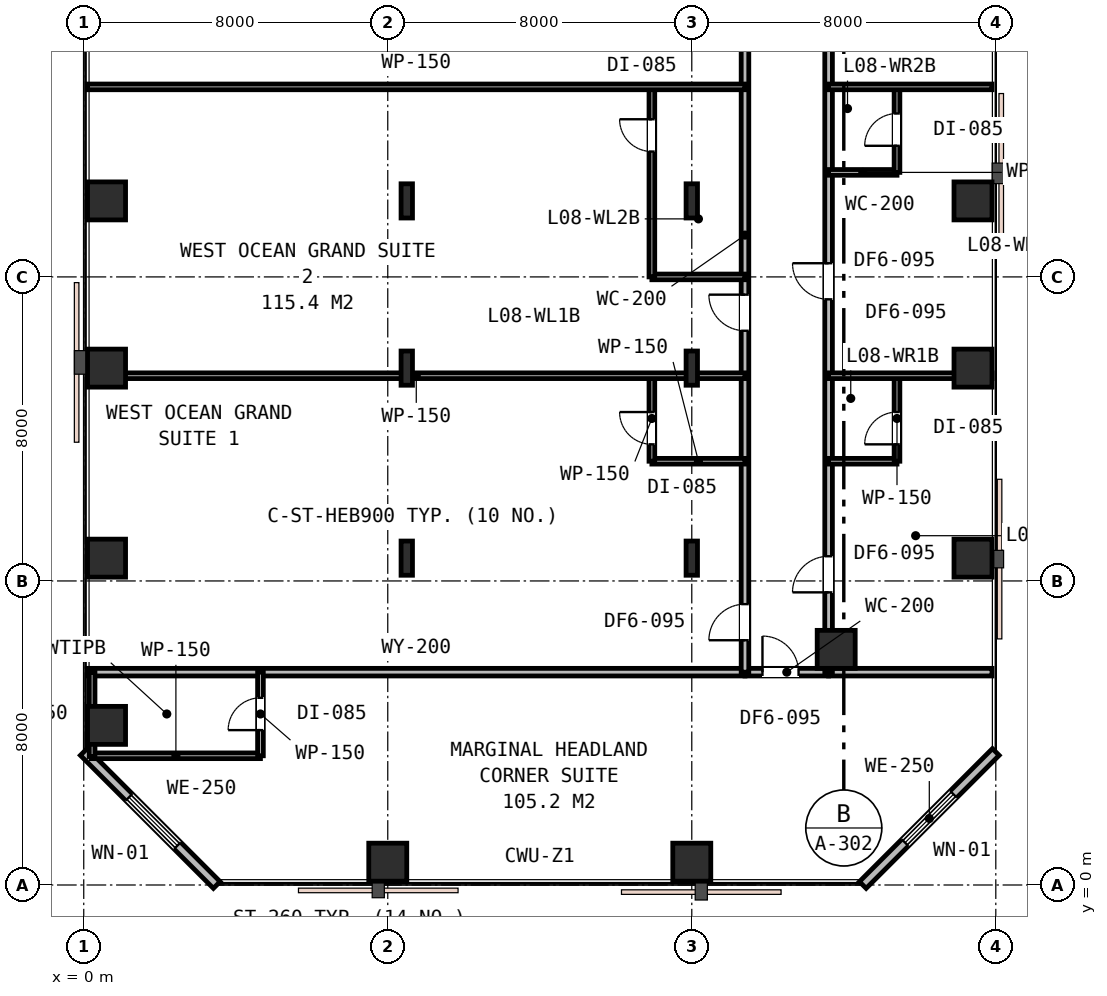
"""IFC4 building model, lengths in metres.
Left out: names, types, materials, properties, quantities, classifications, styles, units other than length and angle.
Written with IfcOpenShell. Run it as: python <this file> out.ifc"""

import sys

from ifc_helpers import new_model, si_unit, direction, frame, frame_2d, origin, origin_2d, place, context, subcontext, project, spatial, rectangle, i_section, extrude, element, fill, save


model = new_model("IFC4")
c1 = context("Model", 3, precision=1e-05, world=origin(), true_north=direction((0.0, 1.0)))
c2 = subcontext(c1, "Body", "Model", "MODEL_VIEW")
j1 = project(units=[si_unit("LENGTHUNIT", "METRE"), si_unit("PLANEANGLEUNIT", "RADIAN")], contexts=[c1])
p1 = place(None, origin())
s1 = spatial("IfcSite", under=j1, at=p1, CompositionType="ELEMENT")
p2 = place(p1, origin())
s2 = spatial("IfcBuilding", under=s1, at=p2, CompositionType="ELEMENT")
p3 = place(p2, frame((0.0, 0.0, 36.6)))
s3 = spatial("IfcBuildingStorey", under=s2, at=p3, CompositionType="ELEMENT", Elevation=36.6)
for number, where, z_axis, x_axis in (
    (1, (0.6, 8.6, 0.0), (0.0, 0.0, 1.0), (1.0, 0.0, 0.0)),
    (2, (0.6, 13.6, 0.0), (0.0, 0.0, 1.0), (1.0, 0.0, 0.0)),
    (3, (0.6, 18.0, 0.0), (0.0, 0.0, 1.0), (1.0, 0.0, 0.0)),
    (4, (0.6, 4.2, 0.0), (0.0, 0.0, 1.0), (1.0, 0.0, 0.0)),
    (5, (8.0, 0.6, 0.0), (0.0, 0.0, 1.0), (1.0, 0.0, 0.0)),
    (6, (16.0, 0.6, 0.0), (0.0, 0.0, 1.0), (1.0, 0.0, 0.0)),
    (7, (19.8, 6.2, 0.0), (0.0, 0.0, 1.0), (1.0, 0.0, 0.0)),
    (8, (23.4, 8.6, 0.0), (0.0, 0.0, 1.0), (1.0, 0.0, 0.0)),
    (9, (23.4, 13.6, 0.0), (0.0, 0.0, 1.0), (1.0, 0.0, 0.0)),
    (10, (23.4, 18.0, 0.0), (0.0, 0.0, 1.0), (1.0, 0.0, 0.0)),
):
    element("IfcColumn", number, at=place(p3, frame(where, z_axis=z_axis, x_axis=x_axis)), inside=s3, PredefinedType="COLUMN", context=c2, shape_type="SweptSolid", body=[
        extrude(rectangle(XDim=1.0, YDim=1.0, at=origin_2d()), origin(), (0.0, 0.0, 1.0), 3.6),
    ])
for number, where, z_axis, x_axis in (
    (11, (8.5, 8.6, 0.0), (0.0, 0.0, 1.0), (1.0, 0.0, 0.0)),
    (12, (16.0, 8.6, 0.0), (0.0, 0.0, 1.0), (1.0, 0.0, 0.0)),
    (13, (8.5, 13.6, 0.0), (0.0, 0.0, 1.0), (1.0, 0.0, 0.0)),
    (14, (16.0, 13.6, 0.0), (0.0, 0.0, 1.0), (1.0, 0.0, 0.0)),
    (15, (8.5, 18.0, 0.0), (0.0, 0.0, 1.0), (1.0, 0.0, 0.0)),
    (16, (16.0, 18.0, 0.0), (0.0, 0.0, 1.0), (1.0, 0.0, 0.0)),
):
    element("IfcColumn", number, at=place(p3, frame(where, z_axis=z_axis, x_axis=x_axis)), inside=s3, PredefinedType="COLUMN", context=c2, shape_type="SweptSolid", body=[
        extrude(i_section(OverallWidth=0.3, OverallDepth=0.9, WebThickness=0.018, FlangeThickness=0.035, FilletRadius=0.03, at=origin_2d()), origin(), (0.0, 0.0, 1.0), 3.6),
    ])
p4 = place(p3, frame((20.5, 0.0, 0.0), z_axis=(0.0, 0.0, 1.0), x_axis=(0.707106781187, 0.707106781187, 0.0)))
e17 = element("IfcWall", 17, at=p4, inside=s3, PredefinedType="STANDARD", context=c2, shape_type="SweptSolid", body=[
    extrude(rectangle(XDim=4.95, YDim=0.25, at=frame_2d((2.475, 0.0))), origin(), (0.0, 0.0, 1.0), 3.33),
])
p5 = place(p4, frame((1.575, 0.0, 0.75)))
e18 = element("IfcOpeningElement", 18, at=p5, cuts=e17, PredefinedType="OPENING", context=c2, shape_type="SweptSolid", body=[
    extrude(rectangle(XDim=1.8, YDim=1.85, at=frame_2d((0.9, 0.925))), frame((0.0, 0.135, 0.0), z_axis=(0.0, -1.0, 0.0), x_axis=(1.0, 0.0, 0.0)), (0.0, 0.0, 1.0), 0.27),
])
p6 = place(p3, frame((0.0, 3.5, 0.0), z_axis=(0.0, 0.0, 1.0), x_axis=(0.707106781187, -0.707106781187, 0.0)))
e19 = element("IfcWall", 19, at=p6, inside=s3, PredefinedType="STANDARD", context=c2, shape_type="SweptSolid", body=[
    extrude(rectangle(XDim=4.95, YDim=0.25, at=frame_2d((2.475, 0.0))), origin(), (0.0, 0.0, 1.0), 3.33),
])
p7 = place(p6, frame((1.685, 0.0, 0.75)))
e20 = element("IfcOpeningElement", 20, at=p7, cuts=e19, PredefinedType="OPENING", context=c2, shape_type="SweptSolid", body=[
    extrude(rectangle(XDim=1.8, YDim=1.85, at=frame_2d((0.9, 0.925))), frame((0.0, 0.135, 0.0), z_axis=(0.0, -1.0, 0.0), x_axis=(1.0, 0.0, 0.0)), (0.0, 0.0, 1.0), 0.27),
])
p8 = place(p3, frame((0.1, 5.6, 0.0), z_axis=(0.0, 0.0, 1.0), x_axis=(1.0, 0.0, 0.0)))
e21 = element("IfcWall", 21, at=p8, inside=s3, PredefinedType="PARTITIONING", context=c2, shape_type="SweptSolid", body=[
    extrude(rectangle(XDim=17.3, YDim=0.2, at=frame_2d((8.65, 0.0))), origin(), (0.0, 0.0, 1.0), 2.82),
])
p9 = place(p3, frame((19.6, 5.6, 0.0), z_axis=(0.0, 0.0, 1.0), x_axis=(1.0, 0.0, 0.0)))
e22 = element("IfcWall", 22, at=p9, inside=s3, PredefinedType="PARTITIONING", context=c2, shape_type="SweptSolid", body=[
    extrude(rectangle(XDim=4.3, YDim=0.2, at=frame_2d((2.15, 0.0))), origin(), (0.0, 0.0, 1.0), 3.33),
])
p10 = place(p3, frame((17.4, 5.6, 0.0), z_axis=(0.0, 0.0, 1.0), x_axis=(1.0, 0.0, 0.0)))
e23 = element("IfcWall", 23, at=p10, inside=s3, PredefinedType="PARTITIONING", context=c2, shape_type="SweptSolid", body=[
    extrude(rectangle(XDim=2.2, YDim=0.2, at=frame_2d((1.1, 0.0))), origin(), (0.0, 0.0, 1.0), 3.33),
])
p11 = place(p10, frame((0.46, 0.0, 0.0)))
e24 = element("IfcOpeningElement", 24, at=p11, cuts=e23, PredefinedType="OPENING", context=c2, shape_type="SweptSolid", body=[
    extrude(rectangle(XDim=0.95, YDim=2.15, at=frame_2d((0.475, 1.075))), frame((0.0, 0.11, 0.0), z_axis=(0.0, -1.0, 0.0), x_axis=(1.0, 0.0, 0.0)), (0.0, 0.0, 1.0), 0.22),
])
p12 = place(p3, frame((0.2, 3.4, 0.0), z_axis=(0.0, 0.0, 1.0), x_axis=(1.0, 0.0, 0.0)))
e25 = element("IfcWall", 25, at=p12, inside=s3, PredefinedType="PARTITIONING", context=c2, shape_type="SweptSolid", body=[
    extrude(rectangle(XDim=4.45, YDim=0.15, at=frame_2d((2.225, 0.0))), origin(), (0.0, 0.0, 1.0), 3.33),
])
p13 = place(p3, frame((4.65, 3.4, 0.0), z_axis=(0.0, 0.0, 1.0), x_axis=(0.0, 1.0, 0.0)))
e26 = element("IfcWall", 26, at=p13, inside=s3, PredefinedType="PARTITIONING", context=c2, shape_type="SweptSolid", body=[
    extrude(rectangle(XDim=2.2, YDim=0.15, at=frame_2d((1.1, 0.0))), origin(), (0.0, 0.0, 1.0), 3.33),
])
p14 = place(p13, frame((0.675, 0.0, 0.0)))
e27 = element("IfcOpeningElement", 27, at=p14, cuts=e26, PredefinedType="OPENING", context=c2, shape_type="SweptSolid", body=[
    extrude(rectangle(XDim=0.85, YDim=2.15, at=frame_2d((0.425, 1.075))), frame((0.0, 0.085, 0.0), z_axis=(0.0, -1.0, 0.0), x_axis=(1.0, 0.0, 0.0)), (0.0, 0.0, 1.0), 0.17),
])
p15 = place(p3, frame((0.22, 3.38, 0.0), z_axis=(0.0, 0.0, 1.0), x_axis=(0.0, 1.0, 0.0)))
e28 = element("IfcWall", 28, at=p15, inside=s3, PredefinedType="PARTITIONING", context=c2, shape_type="SweptSolid", body=[
    extrude(rectangle(XDim=2.22, YDim=0.15, at=frame_2d((1.11, 0.0))), origin(), (0.0, 0.0, 1.0), 2.93),
])
p16 = place(p3, frame((17.4, 5.6, 0.0), z_axis=(0.0, 0.0, 1.0), x_axis=(0.0, 1.0, 0.0)))
e29 = element("IfcWall", 29, at=p16, inside=s3, PredefinedType="PARTITIONING", context=c2, shape_type="SweptSolid", body=[
    extrude(rectangle(XDim=23.0, YDim=0.2, at=frame_2d((11.5, 0.0))), origin(), (0.0, 0.0, 1.0), 2.82),
])
p17 = place(p16, frame((0.84, 0.0, 0.0)))
e30 = element("IfcOpeningElement", 30, at=p17, cuts=e29, PredefinedType="OPENING", context=c2, shape_type="SweptSolid", body=[
    extrude(rectangle(XDim=0.95, YDim=2.15, at=frame_2d((0.475, 1.075))), frame((0.0, 0.11, 0.0), z_axis=(0.0, -1.0, 0.0), x_axis=(1.0, 0.0, 0.0)), (0.0, 0.0, 1.0), 0.22),
])
p18 = place(p16, frame((8.983, 0.0, 0.0)))
e31 = element("IfcOpeningElement", 31, at=p18, cuts=e29, PredefinedType="OPENING", context=c2, shape_type="SweptSolid", body=[
    extrude(rectangle(XDim=0.95, YDim=2.15, at=frame_2d((0.475, 1.075))), frame((0.0, 0.11, 0.0), z_axis=(0.0, -1.0, 0.0), x_axis=(1.0, 0.0, 0.0)), (0.0, 0.0, 1.0), 0.22),
])
p19 = place(p16, frame((16.476, 0.0, 0.0)))
e32 = element("IfcOpeningElement", 32, at=p19, cuts=e29, PredefinedType="OPENING", context=c2, shape_type="SweptSolid", body=[
    extrude(rectangle(XDim=0.95, YDim=2.15, at=frame_2d((0.475, 1.075))), frame((0.0, 0.11, 0.0), z_axis=(0.0, -1.0, 0.0), x_axis=(1.0, 0.0, 0.0)), (0.0, 0.0, 1.0), 0.22),
])
p20 = place(p3, frame((14.95, 11.15, 0.0), z_axis=(0.0, 0.0, 1.0), x_axis=(1.0, 0.0, 0.0)))
e33 = element("IfcWall", 33, at=p20, inside=s3, PredefinedType="PARTITIONING", context=c2, shape_type="SweptSolid", body=[
    extrude(rectangle(XDim=2.45, YDim=0.15, at=frame_2d((1.225, 0.0))), origin(), (0.0, 0.0, 1.0), 2.82),
])
p21 = place(p3, frame((14.95, 11.15, 0.0), z_axis=(0.0, 0.0, 1.0), x_axis=(0.0, 1.0, 0.0)))
e34 = element("IfcWall", 34, at=p21, inside=s3, PredefinedType="PARTITIONING", context=c2, shape_type="SweptSolid", body=[
    extrude(rectangle(XDim=2.25, YDim=0.15, at=frame_2d((1.125, 0.0))), origin(), (0.0, 0.0, 1.0), 2.82),
])
p22 = place(p21, frame((0.444, 0.0, 0.0)))
e35 = element("IfcOpeningElement", 35, at=p22, cuts=e34, PredefinedType="OPENING", context=c2, shape_type="SweptSolid", body=[
    extrude(rectangle(XDim=0.85, YDim=2.15, at=frame_2d((0.425, 1.075))), frame((0.0, 0.085, 0.0), z_axis=(0.0, -1.0, 0.0), x_axis=(1.0, 0.0, 0.0)), (0.0, 0.0, 1.0), 0.17),
])
p23 = place(p3, frame((0.1, 13.4, 0.0), z_axis=(0.0, 0.0, 1.0), x_axis=(1.0, 0.0, 0.0)))
e36 = element("IfcWall", 36, at=p23, inside=s3, PredefinedType="PARTITIONING", context=c2, shape_type="SweptSolid", body=[
    extrude(rectangle(XDim=17.3, YDim=0.15, at=frame_2d((8.65, 0.0))), origin(), (0.0, 0.0, 1.0), 2.82),
])
p24 = place(p3, frame((19.6, 5.6, 0.0), z_axis=(0.0, 0.0, 1.0), x_axis=(0.0, 1.0, 0.0)))
e37 = element("IfcWall", 37, at=p24, inside=s3, PredefinedType="PARTITIONING", context=c2, shape_type="SweptSolid", body=[
    extrude(rectangle(XDim=23.0, YDim=0.2, at=frame_2d((11.5, 0.0))), origin(), (0.0, 0.0, 1.0), 2.82),
])
p25 = place(p24, frame((2.1, 0.0, 0.0)))
e38 = element("IfcOpeningElement", 38, at=p25, cuts=e37, PredefinedType="OPENING", context=c2, shape_type="SweptSolid", body=[
    extrude(rectangle(XDim=0.95, YDim=2.15, at=frame_2d((0.475, 1.075))), frame((0.0, 0.11, 0.0), z_axis=(0.0, -1.0, 0.0), x_axis=(1.0, 0.0, 0.0)), (0.0, 0.0, 1.0), 0.22),
])
p26 = place(p24, frame((9.81, 0.0, 0.0)))
e39 = element("IfcOpeningElement", 39, at=p26, cuts=e37, PredefinedType="OPENING", context=c2, shape_type="SweptSolid", body=[
    extrude(rectangle(XDim=0.95, YDim=2.15, at=frame_2d((0.475, 1.075))), frame((0.0, 0.11, 0.0), z_axis=(0.0, -1.0, 0.0), x_axis=(1.0, 0.0, 0.0)), (0.0, 0.0, 1.0), 0.22),
])
p27 = place(p24, frame((17.41, 0.0, 0.0)))
e40 = element("IfcOpeningElement", 40, at=p27, cuts=e37, PredefinedType="OPENING", context=c2, shape_type="SweptSolid", body=[
    extrude(rectangle(XDim=0.95, YDim=2.15, at=frame_2d((0.475, 1.075))), frame((0.0, 0.11, 0.0), z_axis=(0.0, -1.0, 0.0), x_axis=(1.0, 0.0, 0.0)), (0.0, 0.0, 1.0), 0.22),
])
p28 = place(p3, frame((19.6, 11.15, 0.0), z_axis=(0.0, 0.0, 1.0), x_axis=(1.0, 0.0, 0.0)))
e41 = element("IfcWall", 41, at=p28, inside=s3, PredefinedType="PARTITIONING", context=c2, shape_type="SweptSolid", body=[
    extrude(rectangle(XDim=1.8, YDim=0.15, at=frame_2d((0.9, 0.0))), origin(), (0.0, 0.0, 1.0), 2.96),
])
p29 = place(p3, frame((21.4, 11.15, 0.0), z_axis=(0.0, 0.0, 1.0), x_axis=(0.0, 1.0, 0.0)))
e42 = element("IfcWall", 42, at=p29, inside=s3, PredefinedType="PARTITIONING", context=c2, shape_type="SweptSolid", body=[
    extrude(rectangle(XDim=2.25, YDim=0.15, at=frame_2d((1.125, 0.0))), origin(), (0.0, 0.0, 1.0), 2.82),
])
p30 = place(p29, frame((0.444, 0.0, 0.0)))
e43 = element("IfcOpeningElement", 43, at=p30, cuts=e42, PredefinedType="OPENING", context=c2, shape_type="SweptSolid", body=[
    extrude(rectangle(XDim=0.85, YDim=2.15, at=frame_2d((0.425, 1.075))), frame((0.0, 0.085, 0.0), z_axis=(0.0, -1.0, 0.0), x_axis=(1.0, 0.0, 0.0)), (0.0, 0.0, 1.0), 0.17),
])
p31 = place(p3, frame((19.6, 13.4, 0.0), z_axis=(0.0, 0.0, 1.0), x_axis=(1.0, 0.0, 0.0)))
e44 = element("IfcWall", 44, at=p31, inside=s3, PredefinedType="PARTITIONING", context=c2, shape_type="SweptSolid", body=[
    extrude(rectangle(XDim=4.3, YDim=0.15, at=frame_2d((2.15, 0.0))), origin(), (0.0, 0.0, 1.0), 2.82),
])
p32 = place(p3, frame((14.95, 16.0, 0.0), z_axis=(0.0, 0.0, 1.0), x_axis=(1.0, 0.0, 0.0)))
e45 = element("IfcWall", 45, at=p32, inside=s3, PredefinedType="PARTITIONING", context=c2, shape_type="SweptSolid", body=[
    extrude(rectangle(XDim=2.45, YDim=0.15, at=frame_2d((1.225, 0.0))), origin(), (0.0, 0.0, 1.0), 2.82),
])
p33 = place(p3, frame((14.95, 16.0, 0.0), z_axis=(0.0, 0.0, 1.0), x_axis=(0.0, 1.0, 0.0)))
e46 = element("IfcWall", 46, at=p33, inside=s3, PredefinedType="PARTITIONING", context=c2, shape_type="SweptSolid", body=[
    extrude(rectangle(XDim=5.0, YDim=0.15, at=frame_2d((2.5, 0.0))), origin(), (0.0, 0.0, 1.0), 2.82),
])
p34 = place(p33, frame((3.298, 0.0, 0.0)))
e47 = element("IfcOpeningElement", 47, at=p34, cuts=e46, PredefinedType="OPENING", context=c2, shape_type="SweptSolid", body=[
    extrude(rectangle(XDim=0.85, YDim=2.15, at=frame_2d((0.425, 1.075))), frame((0.0, 0.085, 0.0), z_axis=(0.0, -1.0, 0.0), x_axis=(1.0, 0.0, 0.0)), (0.0, 0.0, 1.0), 0.17),
])
p35 = place(p3, frame((0.1, 21.0, 0.0), z_axis=(0.0, 0.0, 1.0), x_axis=(1.0, 0.0, 0.0)))
e48 = element("IfcWall", 48, at=p35, inside=s3, PredefinedType="PARTITIONING", context=c2, shape_type="SweptSolid", body=[
    extrude(rectangle(XDim=17.3, YDim=0.15, at=frame_2d((8.65, 0.0))), origin(), (0.0, 0.0, 1.0), 2.82),
])
p36 = place(p3, frame((19.6, 18.75, 0.0), z_axis=(0.0, 0.0, 1.0), x_axis=(1.0, 0.0, 0.0)))
e49 = element("IfcWall", 49, at=p36, inside=s3, PredefinedType="PARTITIONING", context=c2, shape_type="SweptSolid", body=[
    extrude(rectangle(XDim=1.8, YDim=0.15, at=frame_2d((0.9, 0.0))), origin(), (0.0, 0.0, 1.0), 3.33),
])
p37 = place(p3, frame((21.4, 18.75, 0.0), z_axis=(0.0, 0.0, 1.0), x_axis=(0.0, 1.0, 0.0)))
e50 = element("IfcWall", 50, at=p37, inside=s3, PredefinedType="PARTITIONING", context=c2, shape_type="SweptSolid", body=[
    extrude(rectangle(XDim=2.25, YDim=0.15, at=frame_2d((1.125, 0.0))), origin(), (0.0, 0.0, 1.0), 3.33),
])
p38 = place(p37, frame((0.7, 0.0, 0.0)))
e51 = element("IfcOpeningElement", 51, at=p38, cuts=e50, PredefinedType="OPENING", context=c2, shape_type="SweptSolid", body=[
    extrude(rectangle(XDim=0.85, YDim=2.15, at=frame_2d((0.425, 1.075))), frame((0.0, 0.085, 0.0), z_axis=(0.0, -1.0, 0.0), x_axis=(1.0, 0.0, 0.0)), (0.0, 0.0, 1.0), 0.17),
])
p39 = place(p3, frame((19.6, 21.0, 0.0), z_axis=(0.0, 0.0, 1.0), x_axis=(1.0, 0.0, 0.0)))
e52 = element("IfcWall", 52, at=p39, inside=s3, PredefinedType="PARTITIONING", context=c2, shape_type="SweptSolid", body=[
    extrude(rectangle(XDim=4.3, YDim=0.15, at=frame_2d((2.15, 0.0))), origin(), (0.0, 0.0, 1.0), 3.33),
])
p40 = place(p5, origin())
e53 = element("IfcWindow", 53, at=p40, inside=s3, PartitioningType="SINGLE_PANEL", PredefinedType="WINDOW", context=c2, shape_type="SweptSolid", body=[
    extrude(rectangle(XDim=1.8, YDim=1.85, at=frame_2d((0.9, 0.925))), frame((0.0, 0.03, 0.0), z_axis=(0.0, -1.0, 0.0), x_axis=(1.0, 0.0, 0.0)), (0.0, 0.0, 1.0), 0.06),
])
fill(e18, e53)
p41 = place(p7, origin())
e54 = element("IfcWindow", 54, at=p41, inside=s3, PartitioningType="SINGLE_PANEL", PredefinedType="WINDOW", context=c2, shape_type="SweptSolid", body=[
    extrude(rectangle(XDim=1.8, YDim=1.85, at=frame_2d((0.9, 0.925))), frame((0.0, 0.03, 0.0), z_axis=(0.0, -1.0, 0.0), x_axis=(1.0, 0.0, 0.0)), (0.0, 0.0, 1.0), 0.06),
])
fill(e20, e54)
p42 = place(p11, origin())
e55 = element("IfcDoor", 55, at=p42, inside=s3, OperationType="SINGLE_SWING_LEFT", PredefinedType="DOOR", context=c2, shape_type="SweptSolid", body=[
    extrude(rectangle(XDim=0.95, YDim=2.15, at=frame_2d((0.475, 1.075))), frame((0.0, 0.025, 0.0), z_axis=(0.0, -1.0, 0.0), x_axis=(1.0, 0.0, 0.0)), (0.0, 0.0, 1.0), 0.05),
])
fill(e24, e55)
p43 = place(p14, origin())
e56 = element("IfcDoor", 56, at=p43, inside=s3, OperationType="SINGLE_SWING_LEFT", PredefinedType="DOOR", context=c2, shape_type="SweptSolid", body=[
    extrude(rectangle(XDim=0.85, YDim=2.15, at=frame_2d((0.425, 1.075))), frame((0.0, 0.025, 0.0), z_axis=(0.0, -1.0, 0.0), x_axis=(1.0, 0.0, 0.0)), (0.0, 0.0, 1.0), 0.05),
])
fill(e27, e56)
p44 = place(p17, origin())
e57 = element("IfcDoor", 57, at=p44, inside=s3, OperationType="SINGLE_SWING_LEFT", PredefinedType="DOOR", context=c2, shape_type="SweptSolid", body=[
    extrude(rectangle(XDim=0.95, YDim=2.15, at=frame_2d((0.475, 1.075))), frame((0.0, 0.025, 0.0), z_axis=(0.0, -1.0, 0.0), x_axis=(1.0, 0.0, 0.0)), (0.0, 0.0, 1.0), 0.05),
])
fill(e30, e57)
p45 = place(p22, origin())
e58 = element("IfcDoor", 58, at=p45, inside=s3, OperationType="SINGLE_SWING_RIGHT", PredefinedType="DOOR", context=c2, shape_type="SweptSolid", body=[
    extrude(rectangle(XDim=0.85, YDim=2.15, at=frame_2d((0.425, 1.075))), frame((0.0, 0.025, 0.0), z_axis=(0.0, -1.0, 0.0), x_axis=(1.0, 0.0, 0.0)), (0.0, 0.0, 1.0), 0.05),
])
fill(e35, e58)
p46 = place(p25, origin())
e59 = element("IfcDoor", 59, at=p46, inside=s3, OperationType="SINGLE_SWING_LEFT", PredefinedType="DOOR", context=c2, shape_type="SweptSolid", body=[
    extrude(rectangle(XDim=0.95, YDim=2.15, at=frame_2d((0.475, 1.075))), frame((0.0, 0.025, 0.0), z_axis=(0.0, -1.0, 0.0), x_axis=(1.0, 0.0, 0.0)), (0.0, 0.0, 1.0), 0.05),
])
fill(e38, e59)
p47 = place(p30, origin())
e60 = element("IfcDoor", 60, at=p47, inside=s3, OperationType="SINGLE_SWING_LEFT", PredefinedType="DOOR", context=c2, shape_type="SweptSolid", body=[
    extrude(rectangle(XDim=0.85, YDim=2.15, at=frame_2d((0.425, 1.075))), frame((0.0, 0.025, 0.0), z_axis=(0.0, -1.0, 0.0), x_axis=(1.0, 0.0, 0.0)), (0.0, 0.0, 1.0), 0.05),
])
fill(e43, e60)
p48 = place(p18, origin())
e61 = element("IfcDoor", 61, at=p48, inside=s3, OperationType="SINGLE_SWING_RIGHT", PredefinedType="DOOR", context=c2, shape_type="SweptSolid", body=[
    extrude(rectangle(XDim=0.95, YDim=2.15, at=frame_2d((0.475, 1.075))), frame((0.0, 0.025, 0.0), z_axis=(0.0, -1.0, 0.0), x_axis=(1.0, 0.0, 0.0)), (0.0, 0.0, 1.0), 0.05),
])
fill(e31, e61)
p49 = place(p34, origin())
e62 = element("IfcDoor", 62, at=p49, inside=s3, OperationType="SINGLE_SWING_RIGHT", PredefinedType="DOOR", context=c2, shape_type="SweptSolid", body=[
    extrude(rectangle(XDim=0.85, YDim=2.15, at=frame_2d((0.425, 1.075))), frame((0.0, 0.025, 0.0), z_axis=(0.0, -1.0, 0.0), x_axis=(1.0, 0.0, 0.0)), (0.0, 0.0, 1.0), 0.05),
])
fill(e47, e62)
p50 = place(p26, origin())
e63 = element("IfcDoor", 63, at=p50, inside=s3, OperationType="SINGLE_SWING_RIGHT", PredefinedType="DOOR", context=c2, shape_type="SweptSolid", body=[
    extrude(rectangle(XDim=0.95, YDim=2.15, at=frame_2d((0.475, 1.075))), frame((0.0, 0.025, 0.0), z_axis=(0.0, -1.0, 0.0), x_axis=(1.0, 0.0, 0.0)), (0.0, 0.0, 1.0), 0.05),
])
fill(e39, e63)
p51 = place(p38, origin())
e64 = element("IfcDoor", 64, at=p51, inside=s3, OperationType="SINGLE_SWING_LEFT", PredefinedType="DOOR", context=c2, shape_type="SweptSolid", body=[
    extrude(rectangle(XDim=0.85, YDim=2.15, at=frame_2d((0.425, 1.075))), frame((0.0, 0.025, 0.0), z_axis=(0.0, -1.0, 0.0), x_axis=(1.0, 0.0, 0.0)), (0.0, 0.0, 1.0), 0.05),
])
fill(e51, e64)
save(model, sys.argv[1])
